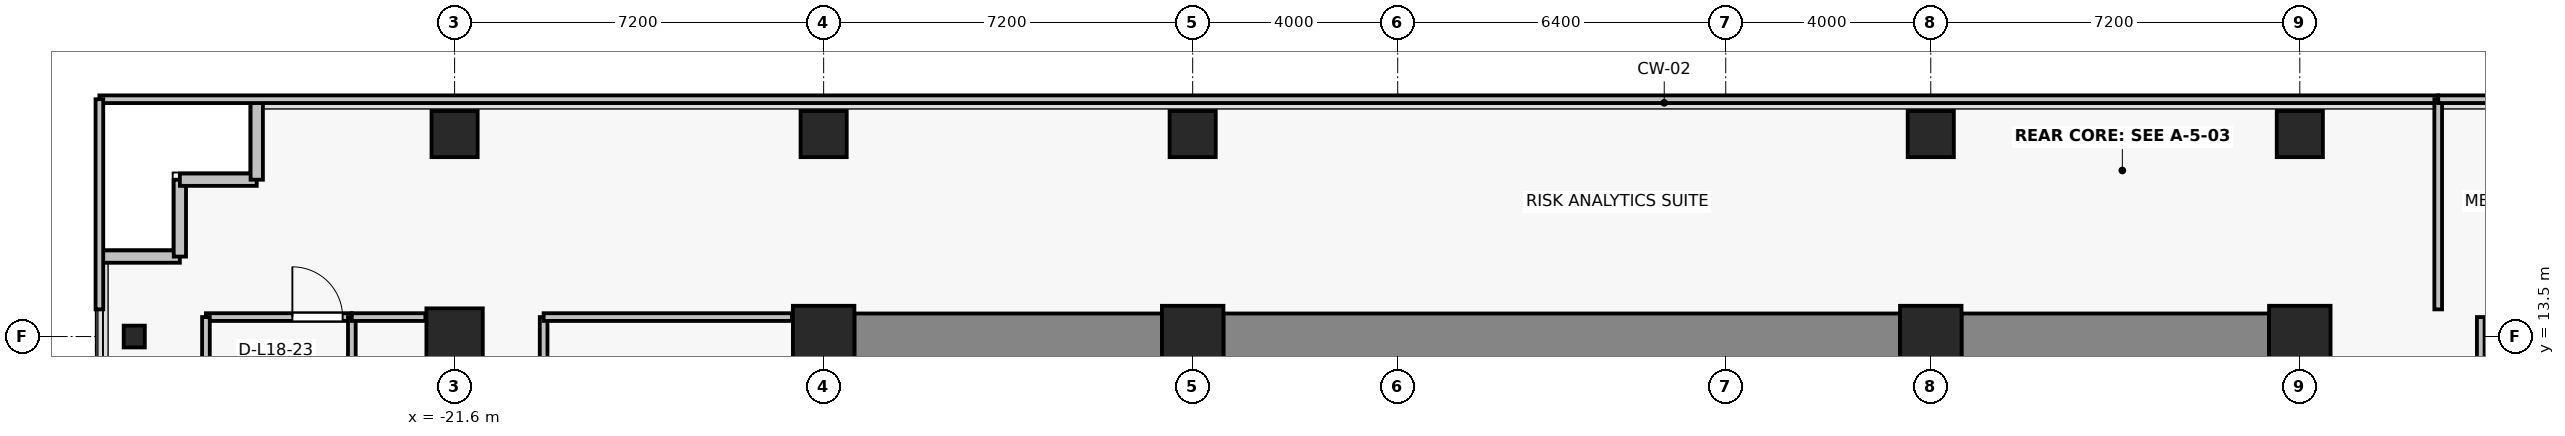
"""IFC4 building model, lengths in metres.
Left out: names, types, materials, properties, quantities, classifications, styles, units other than length and angle.
Written with IfcOpenShell. Run it as: python <this file> out.ifc"""

import sys

from ifc_helpers import new_model, si_unit, direction, frame, frame_2d, origin, origin_2d, place, context, subcontext, project, spatial, rectangle, i_section, extrude, source, transform, mapped, element, fill, save


model = new_model("IFC4")
c1 = context("Model", 3, precision=1e-05, world=origin(), true_north=direction((0.0, 1.0)))
c2 = subcontext(c1, "Body", "Model", "MODEL_VIEW")
j1 = project(units=[si_unit("LENGTHUNIT", "METRE"), si_unit("PLANEANGLEUNIT", "RADIAN")], contexts=[c1])
p1 = place(None, origin())
s1 = spatial("IfcSite", under=j1, at=p1, CompositionType="ELEMENT")
p2 = place(p1, origin())
s2 = spatial("IfcBuilding", under=s1, at=p2, CompositionType="ELEMENT")
p3 = place(p2, frame((0.0, 0.0, 67.0)))
s3 = spatial("IfcBuildingStorey", under=s2, at=p3, CompositionType="ELEMENT", Elevation=67.0)
for number, where, z_axis, x_axis in (
    (1, (-14.4, 13.5, 0.0), (0.0, 0.0, 1.0), (1.0, 0.0, 0.0)),
    (2, (-7.2, 13.5, 0.0), (0.0, 0.0, 1.0), (1.0, 0.0, 0.0)),
    (3, (7.2, 13.5, 0.0), (0.0, 0.0, 1.0), (1.0, 0.0, 0.0)),
    (4, (14.4, 13.5, 0.0), (0.0, 0.0, 1.0), (1.0, 0.0, 0.0)),
):
    element("IfcColumn", number, at=place(p3, frame(where, z_axis=z_axis, x_axis=x_axis)), inside=s3, PredefinedType="COLUMN", context=c2, shape_type="SweptSolid", body=[
        extrude(rectangle(XDim=1.2, YDim=1.2, at=origin_2d()), origin(), (0.0, 0.0, 1.0), 3.3),
    ])
p4 = place(p3, frame((-21.6, 13.5, 0.0), z_axis=(0.0, 0.0, 1.0), x_axis=(1.0, 0.0, 0.0)))
e5 = element("IfcColumn", 5, at=p4, inside=s3, PredefinedType="COLUMN", context=c2, shape_type="SweptSolid", body=[
    extrude(rectangle(XDim=1.1, YDim=1.1, at=origin_2d()), origin(), (0.0, 0.0, 1.0), 3.3),
])
for number, where, z_axis, x_axis in (
    (6, (-14.4, 17.45, 0.0), (0.0, 0.0, 1.0), (1.0, 0.0, 0.0)),
    (7, (-7.2, 17.45, 0.0), (0.0, 0.0, 1.0), (1.0, 0.0, 0.0)),
    (8, (7.2, 17.45, 0.0), (0.0, 0.0, 1.0), (1.0, 0.0, 0.0)),
    (9, (14.4, 17.45, 0.0), (0.0, 0.0, 1.0), (1.0, 0.0, 0.0)),
    (10, (-21.6, 17.45, 0.0), (0.0, 0.0, 1.0), (1.0, 0.0, 0.0)),
):
    element("IfcColumn", number, at=place(p3, frame(where, z_axis=z_axis, x_axis=x_axis)), inside=s3, PredefinedType="COLUMN", context=c2, shape_type="SweptSolid", body=[
        extrude(rectangle(XDim=0.9, YDim=0.9, at=origin_2d()), origin(), (0.0, 0.0, 1.0), 3.3),
    ])
p5 = place(p3, frame((-27.85, 13.5, 0.0), z_axis=(0.0, 0.0, 1.0), x_axis=(1.0, 0.0, 0.0)))
e11 = element("IfcColumn", 11, at=p5, inside=s3, PredefinedType="COLUMN", context=c2, shape_type="SweptSolid", body=[
    extrude(i_section(OverallWidth=0.412, OverallDepth=0.425, WebThickness=0.026, FlangeThickness=0.039, FilletRadius=0.015, at=origin_2d()), origin(), (0.0, 0.0, 1.0), 3.3),
])
p6 = place(p3, frame((-13.8, 13.5, 0.0), z_axis=(0.0, 0.0, 1.0), x_axis=(1.0, 0.0, 0.0)))
e12 = element("IfcWall", 12, at=p6, inside=s3, PredefinedType="SHEAR", context=c2, shape_type="SweptSolid", body=[
    extrude(rectangle(XDim=6.0, YDim=0.9, at=frame_2d((3.0, 0.0))), origin(), (0.0, 0.0, 1.0), 3.075),
])
p7 = place(p3, frame((-6.6, 13.5, 0.0), z_axis=(0.0, 0.0, 1.0), x_axis=(1.0, 0.0, 0.0)))
e13 = element("IfcWall", 13, at=p7, inside=s3, PredefinedType="SHEAR", context=c2, shape_type="SweptSolid", body=[
    extrude(rectangle(XDim=13.2, YDim=0.9, at=frame_2d((6.6, 0.0))), origin(), (0.0, 0.0, 1.0), 3.075),
])
p8 = place(p3, frame((7.8, 13.5, 0.0), z_axis=(0.0, 0.0, 1.0), x_axis=(1.0, 0.0, 0.0)))
e14 = element("IfcWall", 14, at=p8, inside=s3, PredefinedType="SHEAR", context=c2, shape_type="SweptSolid", body=[
    extrude(rectangle(XDim=6.0, YDim=0.9, at=frame_2d((3.0, 0.0))), origin(), (0.0, 0.0, 1.0), 3.075),
])
for number, where, z_axis, x_axis in (
    (15, (-26.96, 15.06, 0.0), (0.0, 0.0, 1.0), (-1.0, 0.0, 0.0)),
    (16, (-26.96, 16.56, 0.0), (0.0, 0.0, 1.0), (0.0, -1.0, 0.0)),
    (17, (-25.46, 16.56, 0.0), (0.0, 0.0, 1.0), (-1.0, 0.0, 0.0)),
    (18, (-25.46, 18.06, 0.0), (0.0, 0.0, 1.0), (0.0, -1.0, 0.0)),
):
    element("IfcWall", number, at=place(p3, frame(where, z_axis=z_axis, x_axis=x_axis)), inside=s3, PredefinedType="SOLIDWALL", context=c2, shape_type="SweptSolid", body=[
        extrude(rectangle(XDim=1.5, YDim=0.24, at=frame_2d((0.75, 0.0))), origin(), (0.0, 0.0, 1.0), 3.075),
    ])
p9 = place(p3, frame((-26.451, 13.88, 0.0), z_axis=(0.0, 0.0, 1.0), x_axis=(1.0, 0.0, 0.0)))
e19 = element("IfcWall", 19, at=p9, inside=s3, PredefinedType="PARTITIONING", context=c2, shape_type="SweptSolid", body=[
    extrude(rectangle(XDim=2.846, YDim=0.15, at=frame_2d((1.423, 0.0))), origin(), (0.0, 0.0, 1.0), 3.075),
])
p10 = place(p9, frame((1.686, 0.0, 0.0)))
e20 = element("IfcOpeningElement", 20, at=p10, cuts=e19, PredefinedType="OPENING", context=c2, shape_type="SweptSolid", body=[
    extrude(rectangle(XDim=0.98, YDim=2.15, at=frame_2d((0.49, 1.075))), frame((0.0, 0.085, 0.0), z_axis=(0.0, -1.0, 0.0), x_axis=(1.0, 0.0, 0.0)), (0.0, 0.0, 1.0), 0.17),
])
for number, where, z_axis, x_axis in (
    (21, (-26.451, -1.77, 0.0), (0.0, 0.0, 1.0), (0.0, 1.0, 0.0)),
    (22, (-23.605, 13.88, 0.0), (0.0, 0.0, 1.0), (0.0, -1.0, 0.0)),
):
    element("IfcWall", number, at=place(p3, frame(where, z_axis=z_axis, x_axis=x_axis)), inside=s3, PredefinedType="PARTITIONING", context=c2, shape_type="SweptSolid", body=[
        extrude(rectangle(XDim=15.65, YDim=0.15, at=frame_2d((7.825, 0.0))), origin(), (0.0, 0.0, 1.0), 2.465),
    ])
p11 = place(p3, frame((-23.605, 13.88, 0.0), z_axis=(0.0, 0.0, 1.0), x_axis=(1.0, 0.0, 0.0)))
e23 = element("IfcWall", 23, at=p11, inside=s3, PredefinedType="PARTITIONING", context=c2, shape_type="SweptSolid", body=[
    extrude(rectangle(XDim=1.435, YDim=0.15, at=frame_2d((0.718, 0.0))), origin(), (0.0, 0.0, 1.0), 3.075),
])
p12 = place(p3, frame((-19.863, 13.88, 0.0), z_axis=(0.0, 0.0, 1.0), x_axis=(0.0, -1.0, 0.0)))
e24 = element("IfcWall", 24, at=p12, inside=s3, PredefinedType="PARTITIONING", context=c2, shape_type="SweptSolid", body=[
    extrude(rectangle(XDim=15.65, YDim=0.15, at=frame_2d((7.825, 0.0))), origin(), (0.0, 0.0, 1.0), 2.465),
])
p13 = place(p3, frame((-19.863, 13.88, 0.0), z_axis=(0.0, 0.0, 1.0), x_axis=(1.0, 0.0, 0.0)))
e25 = element("IfcWall", 25, at=p13, inside=s3, PredefinedType="PARTITIONING", context=c2, shape_type="SweptSolid", body=[
    extrude(rectangle(XDim=4.843, YDim=0.15, at=frame_2d((2.421, 0.0))), origin(), (0.0, 0.0, 1.0), 3.075),
])
p14 = place(p3, frame((17.93, 4.522, 0.0), z_axis=(0.0, 0.0, 1.0), x_axis=(0.0, 1.0, 0.0)))
e26 = element("IfcWall", 26, at=p14, inside=s3, PredefinedType="PARTITIONING", context=c2, shape_type="SweptSolid", body=[
    extrude(rectangle(XDim=9.358, YDim=0.15, at=frame_2d((4.679, 0.0))), origin(), (0.0, 0.0, 1.0), 2.465),
])
p15 = place(p14, frame((4.189, 0.0, 0.0)))
e27 = element("IfcOpeningElement", 27, at=p15, cuts=e26, PredefinedType="OPENING", context=c2, shape_type="SweptSolid", body=[
    extrude(rectangle(XDim=0.98, YDim=2.15, at=frame_2d((0.49, 1.075))), frame((0.0, 0.085, 0.0), z_axis=(0.0, -1.0, 0.0), x_axis=(1.0, 0.0, 0.0)), (0.0, 0.0, 1.0), 0.17),
])
p16 = place(p3, frame((-28.53, 18.13, 0.0), z_axis=(0.0, 0.0, 1.0), x_axis=(1.0, 0.0, 0.0)))
e28 = element("IfcWall", 28, at=p16, inside=s3, PredefinedType="PARTITIONING", context=c2, shape_type="SweptSolid", body=[
    extrude(rectangle(XDim=45.63, YDim=0.15, at=frame_2d((22.815, 0.0))), origin(), (0.0, 0.0, 1.0), 3.075),
])
p17 = place(p3, frame((-28.53, 14.03, 0.0), z_axis=(0.0, 0.0, 1.0), x_axis=(0.0, 1.0, 0.0)))
e29 = element("IfcWall", 29, at=p17, inside=s3, PredefinedType="PARTITIONING", context=c2, shape_type="SweptSolid", body=[
    extrude(rectangle(XDim=4.1, YDim=0.15, at=frame_2d((2.05, 0.0))), origin(), (0.0, 0.0, 1.0), 3.075),
])
p18 = place(p3, frame((17.1, 18.13, 0.0), z_axis=(0.0, 0.0, 1.0), x_axis=(0.0, -1.0, 0.0)))
e30 = element("IfcWall", 30, at=p18, inside=s3, PredefinedType="PARTITIONING", context=c2, shape_type="SweptSolid", body=[
    extrude(rectangle(XDim=4.1, YDim=0.15, at=frame_2d((2.05, 0.0))), origin(), (0.0, 0.0, 1.0), 2.465),
])
p19 = place(p3, frame((17.1, 18.13, 0.0), z_axis=(0.0, 0.0, 1.0), x_axis=(1.0, 0.0, 0.0)))
e31 = element("IfcWall", 31, at=p19, inside=s3, PredefinedType="PARTITIONING", context=c2, shape_type="SweptSolid", body=[
    extrude(rectangle(XDim=15.43, YDim=0.15, at=frame_2d((7.715, 0.0))), origin(), (0.0, 0.0, 1.0), 3.075),
])
m1 = source(origin(), c2, "Body", "SweptSolid", [
    extrude(rectangle(XDim=0.98, YDim=2.15, at=frame_2d((0.49, 1.075))), frame((0.0, 0.025, 0.0), z_axis=(0.0, -1.0, 0.0), x_axis=(1.0, 0.0, 0.0)), (0.0, 0.0, 1.0), 0.05),
])
p20 = place(p10, origin())
e32 = element("IfcDoor", 32, at=p20, inside=s3, OperationType="SINGLE_SWING_LEFT", PredefinedType="DOOR", context=c2, shape_type="MappedRepresentation", body=[
    mapped(m1, transform((0.0, 0.0, 0.0), x_axis=(1.0, 0.0, 0.0), y_axis=(0.0, 1.0, 0.0), z_axis=(0.0, 0.0, 1.0), scale=1.0)),
])
fill(e20, e32)
save(model, sys.argv[1])
